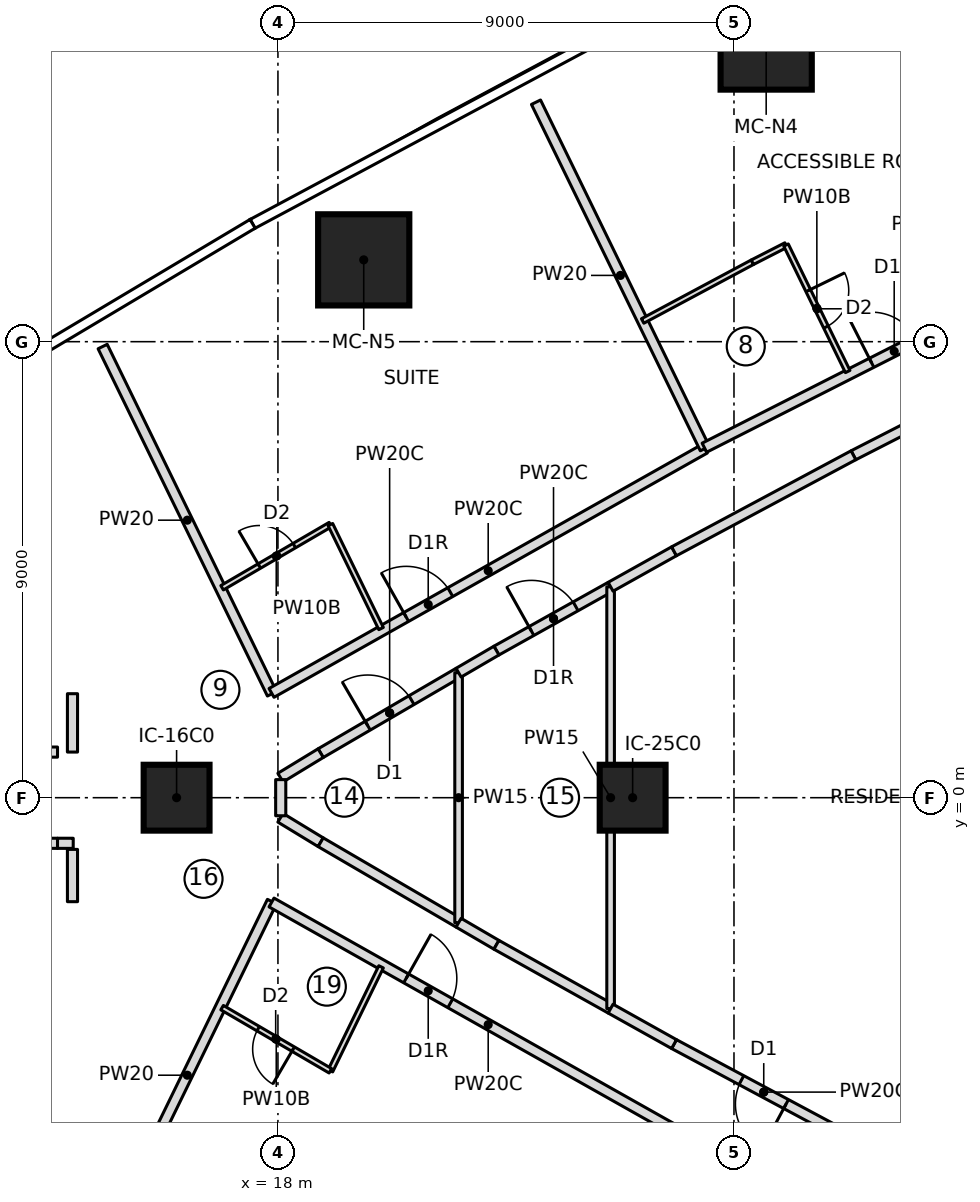
"""IFC4 building model, lengths in metres.
Left out: names, types, materials, properties, quantities, classifications, styles, units other than length and angle.
Written with IfcOpenShell. Run it as: python <this file> out.ifc"""

import sys

from ifc_helpers import new_model, si_unit, direction, frame, frame_2d, origin, origin_2d, place, context, subcontext, project, spatial, rectangle, extrude, element, fill, save


model = new_model("IFC4")
c1 = context("Model", 3, precision=1e-05, world=origin(), true_north=direction((0.0, 1.0)))
c2 = subcontext(c1, "Body", "Model", "MODEL_VIEW")
j1 = project(units=[si_unit("LENGTHUNIT", "METRE"), si_unit("PLANEANGLEUNIT", "RADIAN")], contexts=[c1])
p1 = place(None, origin())
s1 = spatial("IfcSite", under=j1, at=p1, CompositionType="ELEMENT")
p2 = place(p1, origin())
s2 = spatial("IfcBuilding", under=s1, at=p2, CompositionType="ELEMENT")
p3 = place(p2, frame((0.0, 0.0, 60.9)))
s3 = spatial("IfcBuildingStorey", under=s2, at=p3, CompositionType="ELEMENT", Elevation=60.9)
for number, where, z_axis, x_axis in (
    (1, (27.635, 14.874, 0.0), (0.0, 0.0, 1.0), (1.0, 0.0, 0.0)),
    (2, (19.693, 10.615, 0.0), (0.0, 0.0, 1.0), (1.0, 0.0, 0.0)),
):
    element("IfcColumn", number, at=place(p3, frame(where, z_axis=z_axis, x_axis=x_axis)), inside=s3, PredefinedType="COLUMN", context=c2, shape_type="SweptSolid", body=[
        extrude(rectangle(XDim=1.8, YDim=1.8, at=origin_2d()), origin(), (0.0, 0.0, 1.0), 3.55),
    ])
for number, where, z_axis, x_axis in (
    (3, (16.0, 0.0, 0.0), (0.0, 0.0, 1.0), (1.0, 0.0, 0.0)),
    (4, (25.0, 0.0, 0.0), (0.0, 0.0, 1.0), (1.0, 0.0, 0.0)),
):
    element("IfcColumn", number, at=place(p3, frame(where, z_axis=z_axis, x_axis=x_axis)), inside=s3, PredefinedType="COLUMN", context=c2, shape_type="SweptSolid", body=[
        extrude(rectangle(XDim=1.3, YDim=1.3, at=origin_2d()), origin(), (0.0, 0.0, 1.0), 3.55),
    ])
p4 = place(p3, frame((17.882, 2.05, 0.0), z_axis=(0.0, 0.0, 1.0), x_axis=(-0.438213564788, 0.898870887078, 0.0)))
e5 = element("IfcWall", 5, at=p4, inside=s3, PredefinedType="PARTITIONING", context=c2, shape_type="SweptSolid", body=[
    extrude(rectangle(XDim=7.625, YDim=0.2, at=frame_2d((3.813, 0.0))), origin(), (0.0, 0.0, 1.0), 3.25),
])
p5 = place(p3, frame((17.874, 2.068, 0.0), z_axis=(0.0, 0.0, 1.0), x_axis=(0.871078318876, 0.491144136057, 0.0)))
e6 = element("IfcWall", 6, at=p5, inside=s3, PredefinedType="PARTITIONING", context=c2, shape_type="SweptSolid", body=[
    extrude(rectangle(XDim=9.817, YDim=0.2, at=frame_2d((4.909, 0.0))), origin(), (0.0, 0.0, 1.0), 3.25),
])
p6 = place(p5, frame((3.05, 0.0, 0.0)))
e7 = element("IfcOpeningElement", 7, at=p6, cuts=e6, PredefinedType="OPENING", context=c2, shape_type="SweptSolid", body=[
    extrude(rectangle(XDim=1.0, YDim=2.1, at=frame_2d((0.5, 1.05))), frame((0.0, 0.11, 0.0), z_axis=(0.0, -1.0, 0.0), x_axis=(1.0, 0.0, 0.0)), (0.0, 0.0, 1.0), 0.22),
])
p7 = place(p3, frame((16.898, 4.144, 0.0), z_axis=(0.0, 0.0, 1.0), x_axis=(0.863707305865, 0.503993739837, 0.0)))
e8 = element("IfcWall", 8, at=p7, inside=s3, PredefinedType="PARTITIONING", context=c2, shape_type="SweptSolid", body=[
    extrude(rectangle(XDim=2.474, YDim=0.1, at=frame_2d((1.237, 0.0))), origin(), (0.0, 0.0, 1.0), 3.25),
])
p8 = place(p7, frame((0.85, 0.0, 0.0)))
e9 = element("IfcOpeningElement", 9, at=p8, cuts=e8, PredefinedType="OPENING", context=c2, shape_type="SweptSolid", body=[
    extrude(rectangle(XDim=0.8, YDim=2.1, at=frame_2d((0.4, 1.05))), frame((0.0, 0.06, 0.0), z_axis=(0.0, -1.0, 0.0), x_axis=(1.0, 0.0, 0.0)), (0.0, 0.0, 1.0), 0.12),
])
p9 = place(p3, frame((19.035, 5.39, 0.0), z_axis=(0.0, 0.0, 1.0), x_axis=(0.438122322582, -0.898915363344, 0.0)))
e10 = element("IfcWall", 10, at=p9, inside=s3, PredefinedType="PARTITIONING", context=c2, shape_type="SweptSolid", body=[
    extrude(rectangle(XDim=2.283, YDim=0.1, at=frame_2d((1.142, 0.0))), origin(), (0.0, 0.0, 1.0), 3.25),
])
p10 = place(p3, frame((26.425, 6.89, 0.0), z_axis=(0.0, 0.0, 1.0), x_axis=(-0.438202895602, 0.898876088394, 0.0)))
e11 = element("IfcWall", 11, at=p10, inside=s3, PredefinedType="PARTITIONING", context=c2, shape_type="SweptSolid", body=[
    extrude(rectangle(XDim=7.605, YDim=0.2, at=frame_2d((3.803, 0.0))), origin(), (0.0, 0.0, 1.0), 3.25),
])
p11 = place(p3, frame((26.417, 6.908, 0.0), z_axis=(0.0, 0.0, 1.0), x_axis=(0.891700643128, 0.452625632334, 0.0)))
e12 = element("IfcWall", 12, at=p11, inside=s3, PredefinedType="PARTITIONING", context=c2, shape_type="SweptSolid", body=[
    extrude(rectangle(XDim=9.801, YDim=0.2, at=frame_2d((4.901, 0.0))), origin(), (0.0, 0.0, 1.0), 3.25),
])
p12 = place(p11, frame((3.7, 0.0, 0.0)))
e13 = element("IfcOpeningElement", 13, at=p12, cuts=e12, PredefinedType="OPENING", context=c2, shape_type="SweptSolid", body=[
    extrude(rectangle(XDim=1.0, YDim=2.1, at=frame_2d((0.5, 1.05))), frame((0.0, 0.11, 0.0), z_axis=(0.0, -1.0, 0.0), x_axis=(1.0, 0.0, 0.0)), (0.0, 0.0, 1.0), 0.22),
])
p13 = place(p3, frame((25.198, 9.409, 0.0), z_axis=(0.0, 0.0, 1.0), x_axis=(0.881658684569, 0.471887660279, 0.0)))
e14 = element("IfcWall", 14, at=p13, inside=s3, PredefinedType="PARTITIONING", context=c2, shape_type="SweptSolid", body=[
    extrude(rectangle(XDim=2.457, YDim=0.1, at=frame_2d((1.228, 0.0))), origin(), (0.0, 0.0, 1.0), 3.25),
])
p14 = place(p3, frame((27.363, 10.568, 0.0), z_axis=(0.0, 0.0, 1.0), x_axis=(0.890195653003, 0.455578422858, 0.0)))
e15 = element("IfcWall", 15, at=p14, inside=s3, PredefinedType="PARTITIONING", context=c2, shape_type="SweptSolid", body=[
    extrude(rectangle(XDim=0.745, YDim=0.1, at=frame_2d((0.373, 0.0))), origin(), (0.0, 0.0, 1.0), 3.25),
])
p15 = place(p3, frame((28.027, 10.907, 0.0), z_axis=(0.0, 0.0, 1.0), x_axis=(0.438189818179, -0.898882463531, 0.0)))
e16 = element("IfcWall", 16, at=p15, inside=s3, PredefinedType="PARTITIONING", context=c2, shape_type="SweptSolid", body=[
    extrude(rectangle(XDim=2.777, YDim=0.1, at=frame_2d((1.389, 0.0))), origin(), (0.0, 0.0, 1.0), 3.25),
])
p16 = place(p15, frame((1.0, 0.0, 0.0)))
e17 = element("IfcOpeningElement", 17, at=p16, cuts=e16, PredefinedType="OPENING", context=c2, shape_type="SweptSolid", body=[
    extrude(rectangle(XDim=0.8, YDim=2.1, at=frame_2d((0.4, 1.05))), frame((0.0, 0.06, 0.0), z_axis=(0.0, -1.0, 0.0), x_axis=(1.0, 0.0, 0.0)), (0.0, 0.0, 1.0), 0.12),
])
p17 = place(p3, frame((14.541, -8.904, 0.0), z_axis=(0.0, 0.0, 1.0), x_axis=(0.438213564788, 0.898870887078, 0.0)))
e18 = element("IfcWall", 18, at=p17, inside=s3, PredefinedType="PARTITIONING", context=c2, shape_type="SweptSolid", body=[
    extrude(rectangle(XDim=7.625, YDim=0.2, at=frame_2d((3.813, 0.0))), origin(), (0.0, 0.0, 1.0), 3.25),
])
p18 = place(p3, frame((17.874, -2.068, 0.0), z_axis=(0.0, 0.0, 1.0), x_axis=(0.871078318876, -0.491144136057, 0.0)))
e19 = element("IfcWall", 19, at=p18, inside=s3, PredefinedType="PARTITIONING", context=c2, shape_type="SweptSolid", body=[
    extrude(rectangle(XDim=9.817, YDim=0.2, at=frame_2d((4.909, 0.0))), origin(), (0.0, 0.0, 1.0), 3.25),
])
p19 = place(p18, frame((3.05, 0.0, 0.0)))
e20 = element("IfcOpeningElement", 20, at=p19, cuts=e19, PredefinedType="OPENING", context=c2, shape_type="SweptSolid", body=[
    extrude(rectangle(XDim=1.0, YDim=2.1, at=frame_2d((0.5, 1.05))), frame((0.0, 0.11, 0.0), z_axis=(0.0, -1.0, 0.0), x_axis=(1.0, 0.0, 0.0)), (0.0, 0.0, 1.0), 0.22),
])
p20 = place(p3, frame((20.035, -3.338, 0.0), z_axis=(0.0, 0.0, 1.0), x_axis=(-0.438122322582, -0.898915363344, 0.0)))
e21 = element("IfcWall", 21, at=p20, inside=s3, PredefinedType="PARTITIONING", context=c2, shape_type="SweptSolid", body=[
    extrude(rectangle(XDim=2.283, YDim=0.1, at=frame_2d((1.142, 0.0))), origin(), (0.0, 0.0, 1.0), 3.25),
])
p21 = place(p3, frame((19.035, -5.39, 0.0), z_axis=(0.0, 0.0, 1.0), x_axis=(-0.863707305865, 0.503993739837, 0.0)))
e22 = element("IfcWall", 22, at=p21, inside=s3, PredefinedType="PARTITIONING", context=c2, shape_type="SweptSolid", body=[
    extrude(rectangle(XDim=2.474, YDim=0.1, at=frame_2d((1.237, 0.0))), origin(), (0.0, 0.0, 1.0), 3.25),
])
p22 = place(p21, frame((0.85, 0.0, 0.0)))
e23 = element("IfcOpeningElement", 23, at=p22, cuts=e22, PredefinedType="OPENING", context=c2, shape_type="SweptSolid", body=[
    extrude(rectangle(XDim=0.8, YDim=2.1, at=frame_2d((0.4, 1.05))), frame((0.0, 0.06, 0.0), z_axis=(0.0, -1.0, 0.0), x_axis=(1.0, 0.0, 0.0)), (0.0, 0.0, 1.0), 0.12),
])
p23 = place(p3, frame((18.844, 0.879, 0.0), z_axis=(0.0, 0.0, 1.0), x_axis=(0.86371145221, 0.503986634071, 0.0)))
e24 = element("IfcWall", 24, at=p23, inside=s3, PredefinedType="PARTITIONING", context=c2, shape_type="SweptSolid", body=[
    extrude(rectangle(XDim=3.151, YDim=0.2, at=frame_2d((1.576, 0.0))), origin(), (0.0, 0.0, 1.0), 3.25),
])
p24 = place(p23, frame((1.076, 0.0, 0.0)))
e25 = element("IfcOpeningElement", 25, at=p24, cuts=e24, PredefinedType="OPENING", context=c2, shape_type="SweptSolid", body=[
    extrude(rectangle(XDim=1.0, YDim=2.1, at=frame_2d((0.5, 1.05))), frame((0.0, 0.11, 0.0), z_axis=(0.0, -1.0, 0.0), x_axis=(1.0, 0.0, 0.0)), (0.0, 0.0, 1.0), 0.22),
])
for number, where, z_axis, x_axis in (
    (26, (18.844, -0.879, 0.0), (0.0, 0.0, 1.0), (-0.854, 0.52, 0.0)),
    (27, (18.05, 0.396, 0.0), (0.0, 0.0, 1.0), (0.854, 0.52, 0.0)),
):
    element("IfcWall", number, at=place(p3, frame(where, z_axis=z_axis, x_axis=x_axis)), inside=s3, PredefinedType="PARTITIONING", context=c2, shape_type="SweptSolid", body=[
        extrude(rectangle(XDim=0.929, YDim=0.2, at=frame_2d((0.464, 0.0))), origin(), (0.0, 0.0, 1.0), 3.25),
    ])
p25 = place(p3, frame((21.565, -2.467, 0.0), z_axis=(0.0, 0.0, 1.0), x_axis=(-0.86371145221, 0.503986634071, 0.0)))
e28 = element("IfcWall", 28, at=p25, inside=s3, PredefinedType="PARTITIONING", context=c2, shape_type="SweptSolid", body=[
    extrude(rectangle(XDim=3.151, YDim=0.2, at=frame_2d((1.576, 0.0))), origin(), (0.0, 0.0, 1.0), 3.25),
])
p26 = place(p3, frame((21.565, -2.467, 0.0), z_axis=(0.0, 0.0, 1.0), x_axis=(0.0, 1.0, 0.0)))
e29 = element("IfcWall", 29, at=p26, inside=s3, PredefinedType="PARTITIONING", context=c2, shape_type="SweptSolid", body=[
    extrude(rectangle(XDim=4.935, YDim=0.15, at=frame_2d((2.467, 0.0))), origin(), (0.0, 0.0, 1.0), 3.25),
])
p27 = place(p3, frame((22.312, 2.903, 0.0), z_axis=(0.0, 0.0, 1.0), x_axis=(0.872797752414, 0.488082045748, 0.0)))
e30 = element("IfcWall", 30, at=p27, inside=s3, PredefinedType="PARTITIONING", context=c2, shape_type="SweptSolid", body=[
    extrude(rectangle(XDim=2.582, YDim=0.2, at=frame_2d((1.291, 0.0))), origin(), (0.0, 0.0, 1.0), 3.25),
])
p28 = place(p27, frame((0.791, 0.0, 0.0)))
e31 = element("IfcOpeningElement", 31, at=p28, cuts=e30, PredefinedType="OPENING", context=c2, shape_type="SweptSolid", body=[
    extrude(rectangle(XDim=1.0, YDim=2.1, at=frame_2d((0.5, 1.05))), frame((0.0, 0.11, 0.0), z_axis=(0.0, -1.0, 0.0), x_axis=(1.0, 0.0, 0.0)), (0.0, 0.0, 1.0), 0.22),
])
for number, where, z_axis, x_axis in (
    (32, (22.312, -2.903, 0.0), (0.0, 0.0, 1.0), (-0.864, 0.504, 0.0)),
    (33, (21.565, 2.467, 0.0), (0.0, 0.0, 1.0), (0.864, 0.504, 0.0)),
):
    element("IfcWall", number, at=place(p3, frame(where, z_axis=z_axis, x_axis=x_axis)), inside=s3, PredefinedType="PARTITIONING", context=c2, shape_type="SweptSolid", body=[
        extrude(rectangle(XDim=0.865, YDim=0.2, at=frame_2d((0.432, 0.0))), origin(), (0.0, 0.0, 1.0), 3.25),
    ])
p29 = place(p3, frame((24.565, -4.163, 0.0), z_axis=(0.0, 0.0, 1.0), x_axis=(-0.872797752414, 0.488082045748, 0.0)))
e34 = element("IfcWall", 34, at=p29, inside=s3, PredefinedType="PARTITIONING", context=c2, shape_type="SweptSolid", body=[
    extrude(rectangle(XDim=2.582, YDim=0.2, at=frame_2d((1.291, 0.0))), origin(), (0.0, 0.0, 1.0), 3.25),
])
p30 = place(p3, frame((24.565, -4.163, 0.0), z_axis=(0.0, 0.0, 1.0), x_axis=(0.0, 1.0, 0.0)))
e35 = element("IfcWall", 35, at=p30, inside=s3, PredefinedType="PARTITIONING", context=c2, shape_type="SweptSolid", body=[
    extrude(rectangle(XDim=8.326, YDim=0.15, at=frame_2d((4.163, 0.0))), origin(), (0.0, 0.0, 1.0), 3.25),
])
p31 = place(p3, frame((29.357, -6.758, 0.0), z_axis=(0.0, 0.0, 1.0), x_axis=(-0.881655245922, 0.471894084874, 0.0)))
e36 = element("IfcWall", 36, at=p31, inside=s3, PredefinedType="PARTITIONING", context=c2, shape_type="SweptSolid", body=[
    extrude(rectangle(XDim=4.016, YDim=0.2, at=frame_2d((2.008, 0.0))), origin(), (0.0, 0.0, 1.0), 3.25),
])
p32 = place(p31, frame((1.508, 0.0, 0.0)))
e37 = element("IfcOpeningElement", 37, at=p32, cuts=e36, PredefinedType="OPENING", context=c2, shape_type="SweptSolid", body=[
    extrude(rectangle(XDim=1.0, YDim=2.1, at=frame_2d((0.5, 1.05))), frame((0.0, 0.11, 0.0), z_axis=(0.0, -1.0, 0.0), x_axis=(1.0, 0.0, 0.0)), (0.0, 0.0, 1.0), 0.22),
])
p33 = place(p3, frame((29.357, 6.758, 0.0), z_axis=(0.0, 0.0, 1.0), x_axis=(0.890213377055, 0.455543788579, 0.0)))
e38 = element("IfcWall", 38, at=p33, inside=s3, PredefinedType="PARTITIONING", context=c2, shape_type="SweptSolid", body=[
    extrude(rectangle(XDim=2.912, YDim=0.2, at=frame_2d((1.456, 0.0))), origin(), (0.0, 0.0, 1.0), 3.25),
])
for number, where, z_axis, x_axis in (
    (39, (25.817, -4.863, 0.0), (0.0, 0.0, 1.0), (-0.873, 0.488, 0.0)),
    (40, (24.565, 4.163, 0.0), (0.0, 0.0, 1.0), (0.873, 0.488, 0.0)),
):
    element("IfcWall", number, at=place(p3, frame(where, z_axis=z_axis, x_axis=x_axis)), inside=s3, PredefinedType="PARTITIONING", context=c2, shape_type="SweptSolid", body=[
        extrude(rectangle(XDim=1.434, YDim=0.2, at=frame_2d((0.717, 0.0))), origin(), (0.0, 0.0, 1.0), 3.25),
    ])
p34 = place(p3, frame((25.817, 4.863, 0.0), z_axis=(0.0, 0.0, 1.0), x_axis=(0.881655245922, 0.471894084874, 0.0)))
e41 = element("IfcWall", 41, at=p34, inside=s3, PredefinedType="PARTITIONING", context=c2, shape_type="SweptSolid", body=[
    extrude(rectangle(XDim=4.016, YDim=0.2, at=frame_2d((2.008, 0.0))), origin(), (0.0, 0.0, 1.0), 3.25),
])
p35 = place(p3, frame((4.977, 0.9, 0.0), z_axis=(0.0, 0.0, 1.0), x_axis=(1.0, 0.0, 0.0)))
e42 = element("IfcWall", 42, at=p35, inside=s3, PredefinedType="PARTITIONING", context=c2, shape_type="SweptSolid", body=[
    extrude(rectangle(XDim=8.673, YDim=0.2, at=frame_2d((4.336, 0.0))), origin(), (0.0, 0.0, 1.0), 3.25),
])
p36 = place(p35, frame((4.345, 0.0, 0.0)))
e43 = element("IfcOpeningElement", 43, at=p36, cuts=e42, PredefinedType="OPENING", context=c2, shape_type="SweptSolid", body=[
    extrude(rectangle(XDim=1.0, YDim=2.1, at=frame_2d((0.5, 1.05))), frame((0.0, 0.11, 0.0), z_axis=(0.0, -1.0, 0.0), x_axis=(1.0, 0.0, 0.0)), (0.0, 0.0, 1.0), 0.22),
])
p37 = place(p3, frame((4.977, -0.9, 0.0), z_axis=(0.0, 0.0, 1.0), x_axis=(1.0, 0.0, 0.0)))
e44 = element("IfcWall", 44, at=p37, inside=s3, PredefinedType="PARTITIONING", context=c2, shape_type="SweptSolid", body=[
    extrude(rectangle(XDim=8.673, YDim=0.2, at=frame_2d((4.336, 0.0))), origin(), (0.0, 0.0, 1.0), 3.25),
])
p38 = place(p37, frame((4.345, 0.0, 0.0)))
e45 = element("IfcOpeningElement", 45, at=p38, cuts=e44, PredefinedType="OPENING", context=c2, shape_type="SweptSolid", body=[
    extrude(rectangle(XDim=1.0, YDim=2.1, at=frame_2d((0.5, 1.05))), frame((0.0, 0.11, 0.0), z_axis=(0.0, -1.0, 0.0), x_axis=(1.0, 0.0, 0.0)), (0.0, 0.0, 1.0), 0.22),
])
p39 = place(p3, frame((18.055, -0.357, 0.0), z_axis=(0.0, 0.0, 1.0), x_axis=(0.0, 1.0, 0.0)))
e46 = element("IfcWall", 46, at=p39, inside=s3, PredefinedType="PARTITIONING", context=c2, shape_type="SweptSolid", body=[
    extrude(rectangle(XDim=0.713, YDim=0.2, at=frame_2d((0.357, 0.0))), origin(), (0.0, 0.0, 1.0), 3.25),
])
p40 = place(p3, frame((13.946, 2.052, 0.0), z_axis=(0.0, 0.0, 1.0), x_axis=(-0.000423818568, -0.999999910189, 0.0)))
e47 = element("IfcWall", 47, at=p40, inside=s3, PredefinedType="PARTITIONING", context=c2, shape_type="SweptSolid", body=[
    extrude(rectangle(XDim=1.152, YDim=0.2, at=frame_2d((0.576, 0.0))), origin(), (0.0, 0.0, 1.0), 3.25),
])
p41 = place(p3, frame((13.65, -0.9, 0.0), z_axis=(0.0, 0.0, 1.0), x_axis=(0.99999876, -0.001574801197, 0.0)))
e48 = element("IfcWall", 48, at=p41, inside=s3, PredefinedType="PARTITIONING", context=c2, shape_type="SweptSolid", body=[
    extrude(rectangle(XDim=0.31, YDim=0.2, at=frame_2d((0.155, 0.0))), origin(), (0.0, 0.0, 1.0), 3.25),
])
p42 = place(p3, frame((13.945, -1.021, 0.0), z_axis=(0.0, 0.0, 1.0), x_axis=(0.000473148752, -0.999999888065, 0.0)))
e49 = element("IfcWall", 49, at=p42, inside=s3, PredefinedType="PARTITIONING", context=c2, shape_type="SweptSolid", body=[
    extrude(rectangle(XDim=1.032, YDim=0.2, at=frame_2d((0.516, 0.0))), origin(), (0.0, 0.0, 1.0), 3.25),
])
p43 = place(p8, origin())
e50 = element("IfcDoor", 50, at=p43, inside=s3, OperationType="SINGLE_SWING_LEFT", PredefinedType="DOOR", context=c2, shape_type="SweptSolid", body=[
    extrude(rectangle(XDim=0.8, YDim=2.1, at=frame_2d((0.4, 1.05))), frame((0.0, 0.025, 0.0), z_axis=(0.0, -1.0, 0.0), x_axis=(1.0, 0.0, 0.0)), (0.0, 0.0, 1.0), 0.05),
])
fill(e9, e50)
p44 = place(p6, origin())
e51 = element("IfcDoor", 51, at=p44, inside=s3, OperationType="SINGLE_SWING_RIGHT", PredefinedType="DOOR", context=c2, shape_type="SweptSolid", body=[
    extrude(rectangle(XDim=1.0, YDim=2.1, at=frame_2d((0.5, 1.05))), frame((0.0, 0.025, 0.0), z_axis=(0.0, -1.0, 0.0), x_axis=(1.0, 0.0, 0.0)), (0.0, 0.0, 1.0), 0.05),
])
fill(e7, e51)
p45 = place(p16, origin())
e52 = element("IfcDoor", 52, at=p45, inside=s3, OperationType="SINGLE_SWING_LEFT", PredefinedType="DOOR", context=c2, shape_type="SweptSolid", body=[
    extrude(rectangle(XDim=0.8, YDim=2.1, at=frame_2d((0.4, 1.05))), frame((0.0, 0.025, 0.0), z_axis=(0.0, -1.0, 0.0), x_axis=(1.0, 0.0, 0.0)), (0.0, 0.0, 1.0), 0.05),
])
fill(e17, e52)
p46 = place(p12, origin())
e53 = element("IfcDoor", 53, at=p46, inside=s3, OperationType="SINGLE_SWING_RIGHT", PredefinedType="DOOR", context=c2, shape_type="SweptSolid", body=[
    extrude(rectangle(XDim=1.0, YDim=2.1, at=frame_2d((0.5, 1.05))), frame((0.0, 0.025, 0.0), z_axis=(0.0, -1.0, 0.0), x_axis=(1.0, 0.0, 0.0)), (0.0, 0.0, 1.0), 0.05),
])
fill(e13, e53)
p47 = place(p22, origin())
e54 = element("IfcDoor", 54, at=p47, inside=s3, OperationType="SINGLE_SWING_LEFT", PredefinedType="DOOR", context=c2, shape_type="SweptSolid", body=[
    extrude(rectangle(XDim=0.8, YDim=2.1, at=frame_2d((0.4, 1.05))), frame((0.0, 0.025, 0.0), z_axis=(0.0, -1.0, 0.0), x_axis=(1.0, 0.0, 0.0)), (0.0, 0.0, 1.0), 0.05),
])
fill(e23, e54)
p48 = place(p19, origin())
e55 = element("IfcDoor", 55, at=p48, inside=s3, OperationType="SINGLE_SWING_RIGHT", PredefinedType="DOOR", context=c2, shape_type="SweptSolid", body=[
    extrude(rectangle(XDim=1.0, YDim=2.1, at=frame_2d((0.5, 1.05))), frame((0.0, 0.025, 0.0), z_axis=(0.0, -1.0, 0.0), x_axis=(1.0, 0.0, 0.0)), (0.0, 0.0, 1.0), 0.05),
])
fill(e20, e55)
p49 = place(p24, origin())
e56 = element("IfcDoor", 56, at=p49, inside=s3, OperationType="SINGLE_SWING_LEFT", PredefinedType="DOOR", context=c2, shape_type="SweptSolid", body=[
    extrude(rectangle(XDim=1.0, YDim=2.1, at=frame_2d((0.5, 1.05))), frame((0.0, 0.025, 0.0), z_axis=(0.0, -1.0, 0.0), x_axis=(1.0, 0.0, 0.0)), (0.0, 0.0, 1.0), 0.05),
])
fill(e25, e56)
p50 = place(p28, origin())
e57 = element("IfcDoor", 57, at=p50, inside=s3, OperationType="SINGLE_SWING_RIGHT", PredefinedType="DOOR", context=c2, shape_type="SweptSolid", body=[
    extrude(rectangle(XDim=1.0, YDim=2.1, at=frame_2d((0.5, 1.05))), frame((0.0, 0.025, 0.0), z_axis=(0.0, -1.0, 0.0), x_axis=(1.0, 0.0, 0.0)), (0.0, 0.0, 1.0), 0.05),
])
fill(e31, e57)
p51 = place(p32, origin())
e58 = element("IfcDoor", 58, at=p51, inside=s3, OperationType="SINGLE_SWING_LEFT", PredefinedType="DOOR", context=c2, shape_type="SweptSolid", body=[
    extrude(rectangle(XDim=1.0, YDim=2.1, at=frame_2d((0.5, 1.05))), frame((0.0, 0.025, 0.0), z_axis=(0.0, -1.0, 0.0), x_axis=(1.0, 0.0, 0.0)), (0.0, 0.0, 1.0), 0.05),
])
fill(e37, e58)
save(model, sys.argv[1])
